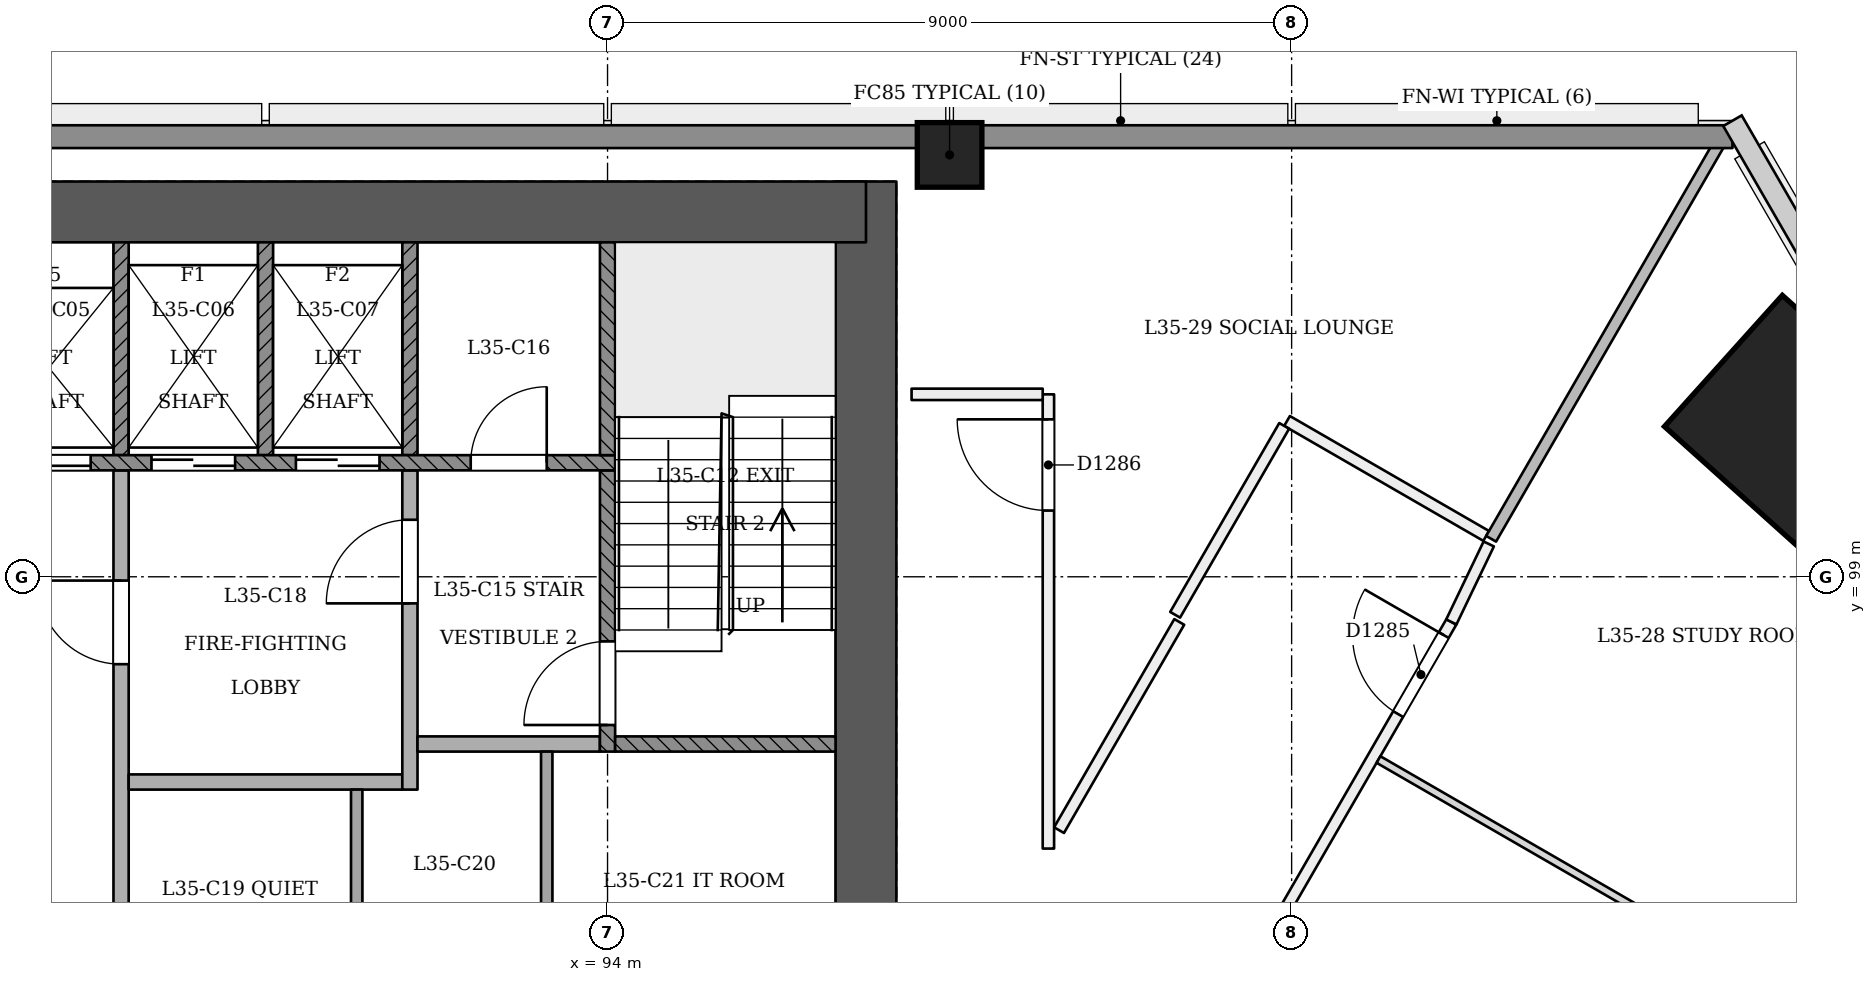
"""IFC4 building model, lengths in metres.
Left out: names, types, materials, properties, quantities, classifications, styles, units other than length and angle.
Written with IfcOpenShell. Run it as: python <this file> out.ifc"""

import sys

from ifc_helpers import new_model, si_unit, direction, frame, frame_2d, origin, origin_2d, place, context, subcontext, project, spatial, rectangle, extrude, element, fill, save


model = new_model("IFC4")
c1 = context("Model", 3, precision=1e-05, world=origin(), true_north=direction((0.0, 1.0)))
c2 = subcontext(c1, "Body", "Model", "MODEL_VIEW")
j1 = project(units=[si_unit("LENGTHUNIT", "METRE"), si_unit("PLANEANGLEUNIT", "RADIAN")], contexts=[c1])
p1 = place(None, origin())
s1 = spatial("IfcSite", under=j1, at=p1, CompositionType="ELEMENT")
p2 = place(p1, origin())
s2 = spatial("IfcBuilding", under=s1, at=p2, CompositionType="ELEMENT")
p3 = place(p2, frame((0.0, 0.0, 138.6)))
s3 = spatial("IfcBuildingStorey", under=s2, at=p3, CompositionType="ELEMENT", Elevation=138.6)
p4 = place(p3, frame((97.4, 93.0, 0.0), z_axis=(0.0, 0.0, 1.0), x_axis=(0.0, 1.0, 0.0)))
e1 = element("IfcWall", 1, at=p4, inside=s3, PredefinedType="SHEAR", context=c2, shape_type="SweptSolid", body=[
    extrude(rectangle(XDim=11.2, YDim=0.8, at=frame_2d((5.6, 0.0))), origin(), (0.0, 0.0, 1.0), 3.6),
])
p5 = place(p3, frame((97.4, 103.8, 0.0), z_axis=(0.0, 0.0, 1.0), x_axis=(-1.0, 0.0, 0.0)))
e2 = element("IfcWall", 2, at=p5, inside=s3, PredefinedType="SHEAR", context=c2, shape_type="SweptSolid", body=[
    extrude(rectangle(XDim=25.2, YDim=0.8, at=frame_2d((12.6, 0.0))), origin(), (0.0, 0.0, 1.0), 3.6),
])
p6 = place(p3, frame((109.577, 101.053, 0.0), z_axis=(-0.028403721265, 0.009287135593, 0.999553389135), x_axis=(0.498883801201, -0.866383831898, 0.022226307065)))
e3 = element("IfcColumn", 3, at=p6, inside=s3, PredefinedType="COLUMN", context=c2, shape_type="SweptSolid", body=[
    extrude(rectangle(XDim=2.32, YDim=2.32, at=origin_2d()), origin(), (0.0, 0.0, 1.0), 3.602),
])
p7 = place(p3, frame((98.5, 104.55, 0.0), z_axis=(0.0, 0.0, 1.0), x_axis=(1.0, 0.0, 0.0)))
e4 = element("IfcColumn", 4, at=p7, inside=s3, PredefinedType="COLUMN", context=c2, shape_type="SweptSolid", body=[
    extrude(rectangle(XDim=0.85, YDim=0.85, at=origin_2d()), origin(), (0.0, 0.0, 1.0), 3.6),
])
p8 = place(p3, frame((85.054, 63.684, 0.0), z_axis=(0.0, 0.0, 1.0), x_axis=(0.499999704591, 0.866025574339, 0.0)))
e5 = element("IfcWall", 5, at=p8, inside=s3, PredefinedType="PARTITIONING", context=c2, shape_type="SweptSolid", body=[
    extrude(rectangle(XDim=40.094, YDim=0.15, at=frame_2d((20.047, 0.0))), origin(), (0.0, 0.0, 1.0), 2.75),
])
p9 = place(p8, frame((0.506, 0.0, 0.0)))
e6 = element("IfcOpeningElement", 6, at=p9, cuts=e5, PredefinedType="OPENING", context=c2, shape_type="SweptSolid", body=[
    extrude(rectangle(XDim=1.2, YDim=2.1, at=frame_2d((0.6, 1.05))), frame((0.0, 0.085, 0.0), z_axis=(0.0, -1.0, 0.0), x_axis=(1.0, 0.0, 0.0)), (0.0, 0.0, 1.0), 0.171),
])
p10 = place(p8, frame((2.767, 0.0, 0.0)))
e7 = element("IfcOpeningElement", 7, at=p10, cuts=e5, PredefinedType="OPENING", context=c2, shape_type="SweptSolid", body=[
    extrude(rectangle(XDim=1.0, YDim=2.1, at=frame_2d((0.5, 1.05))), frame((0.0, 0.085, 0.0), z_axis=(0.0, -1.0, 0.0), x_axis=(1.0, 0.0, 0.0)), (0.0, 0.0, 1.0), 0.171),
])
p11 = place(p8, frame((8.297, 0.0, 0.0)))
e8 = element("IfcOpeningElement", 8, at=p11, cuts=e5, PredefinedType="OPENING", context=c2, shape_type="SweptSolid", body=[
    extrude(rectangle(XDim=1.0, YDim=2.1, at=frame_2d((0.5, 1.05))), frame((0.0, 0.085, 0.0), z_axis=(0.0, -1.0, 0.0), x_axis=(1.0, 0.0, 0.0)), (0.0, 0.0, 1.0), 0.171),
])
p12 = place(p8, frame((11.652, 0.0, 0.0)))
e9 = element("IfcOpeningElement", 9, at=p12, cuts=e5, PredefinedType="OPENING", context=c2, shape_type="SweptSolid", body=[
    extrude(rectangle(XDim=1.0, YDim=2.1, at=frame_2d((0.5, 1.05))), frame((0.0, 0.085, 0.0), z_axis=(0.0, -1.0, 0.0), x_axis=(1.0, 0.0, 0.0)), (0.0, 0.0, 1.0), 0.171),
])
p13 = place(p8, frame((18.327, 0.0, 0.0)))
e10 = element("IfcOpeningElement", 10, at=p13, cuts=e5, PredefinedType="OPENING", context=c2, shape_type="SweptSolid", body=[
    extrude(rectangle(XDim=1.0, YDim=2.1, at=frame_2d((0.5, 1.05))), frame((0.0, 0.085, 0.0), z_axis=(0.0, -1.0, 0.0), x_axis=(1.0, 0.0, 0.0)), (0.0, 0.0, 1.0), 0.171),
])
p14 = place(p8, frame((20.767, 0.0, 0.0)))
e11 = element("IfcOpeningElement", 11, at=p14, cuts=e5, PredefinedType="OPENING", context=c2, shape_type="SweptSolid", body=[
    extrude(rectangle(XDim=1.0, YDim=2.1, at=frame_2d((0.5, 1.05))), frame((0.0, 0.085, 0.0), z_axis=(0.0, -1.0, 0.0), x_axis=(1.0, 0.0, 0.0)), (0.0, 0.0, 1.0), 0.171),
])
p15 = place(p8, frame((26.297, 0.0, 0.0)))
e12 = element("IfcOpeningElement", 12, at=p15, cuts=e5, PredefinedType="OPENING", context=c2, shape_type="SweptSolid", body=[
    extrude(rectangle(XDim=1.0, YDim=2.1, at=frame_2d((0.5, 1.05))), frame((0.0, 0.085, 0.0), z_axis=(0.0, -1.0, 0.0), x_axis=(1.0, 0.0, 0.0)), (0.0, 0.0, 1.0), 0.171),
])
p16 = place(p8, frame((31.847, 0.0, 0.0)))
e13 = element("IfcOpeningElement", 13, at=p16, cuts=e5, PredefinedType="OPENING", context=c2, shape_type="SweptSolid", body=[
    extrude(rectangle(XDim=1.2, YDim=2.1, at=frame_2d((0.6, 1.05))), frame((0.0, 0.085, 0.0), z_axis=(0.0, -1.0, 0.0), x_axis=(1.0, 0.0, 0.0)), (0.0, 0.0, 1.0), 0.171),
])
p17 = place(p8, frame((38.694, 0.0, 0.0)))
e14 = element("IfcOpeningElement", 14, at=p17, cuts=e5, PredefinedType="OPENING", context=c2, shape_type="SweptSolid", body=[
    extrude(rectangle(XDim=1.2, YDim=2.1, at=frame_2d((0.6, 1.05))), frame((0.0, 0.085, 0.0), z_axis=(0.0, -1.0, 0.0), x_axis=(1.0, 0.0, 0.0)), (0.0, 0.0, 1.0), 0.171),
])
p18 = place(p3, frame((105.101, 98.406, 0.0), z_axis=(0.0, 0.0, 1.0), x_axis=(0.432472883735, 0.901646940234, 0.0)))
e15 = element("IfcWall", 15, at=p18, inside=s3, PredefinedType="PARTITIONING", context=c2, shape_type="SweptSolid", body=[
    extrude(rectangle(XDim=1.137, YDim=0.15, at=frame_2d((0.569, 0.0))), origin(), (0.0, 0.0, 1.0), 3.15),
])
p19 = place(p3, frame((105.559, 99.538, 0.0), z_axis=(0.0, 0.0, 1.0), x_axis=(-0.866024298998, 0.500001913541, 0.0)))
e16 = element("IfcWall", 16, at=p19, inside=s3, PredefinedType="PARTITIONING", context=c2, shape_type="SweptSolid", body=[
    extrude(rectangle(XDim=3.025, YDim=0.15, at=frame_2d((1.512, 0.0))), origin(), (0.0, 0.0, 1.0), 3.15),
])
p20 = place(p3, frame((102.902, 100.985, 0.0), z_axis=(0.0, 0.0, 1.0), x_axis=(-0.499945861543, -0.866056658381, 0.0)))
e17 = element("IfcWall", 17, at=p20, inside=s3, PredefinedType="PARTITIONING", context=c2, shape_type="SweptSolid", body=[
    extrude(rectangle(XDim=2.869, YDim=0.15, at=frame_2d((1.435, 0.0))), origin(), (0.0, 0.0, 1.0), 3.15),
])
p21 = place(p3, frame((101.522, 98.406, 0.0), z_axis=(0.0, 0.0, 1.0), x_axis=(-0.499998569178, -0.866026229868, 0.0)))
e18 = element("IfcWall", 18, at=p21, inside=s3, PredefinedType="PARTITIONING", context=c2, shape_type="SweptSolid", body=[
    extrude(rectangle(XDim=3.164, YDim=0.15, at=frame_2d((1.582, 0.0))), origin(), (0.0, 0.0, 1.0), 3.15),
])
p22 = place(p3, frame((99.8, 95.424, 0.0), z_axis=(0.0, 0.0, 1.0), x_axis=(0.0, 1.0, 0.0)))
e19 = element("IfcWall", 19, at=p22, inside=s3, PredefinedType="PARTITIONING", context=c2, shape_type="SweptSolid", body=[
    extrude(rectangle(XDim=5.976, YDim=0.15, at=frame_2d((2.988, 0.0))), origin(), (0.0, 0.0, 1.0), 3.15),
])
p23 = place(p22, frame((4.447, 0.0, 0.0)))
e20 = element("IfcOpeningElement", 20, at=p23, cuts=e19, PredefinedType="OPENING", context=c2, shape_type="SweptSolid", body=[
    extrude(rectangle(XDim=1.2, YDim=2.1, at=frame_2d((0.6, 1.05))), frame((0.0, 0.085, 0.0), z_axis=(0.0, -1.0, 0.0), x_axis=(1.0, 0.0, 0.0)), (0.0, 0.0, 1.0), 0.171),
])
p24 = place(p3, frame((99.725, 101.4, 0.0), z_axis=(0.0, 0.0, 1.0), x_axis=(-1.0, 0.0, 0.0)))
e21 = element("IfcWall", 21, at=p24, inside=s3, PredefinedType="PARTITIONING", context=c2, shape_type="SweptSolid", body=[
    extrude(rectangle(XDim=1.725, YDim=0.15, at=frame_2d((0.863, 0.0))), origin(), (0.0, 0.0, 1.0), 3.15),
])
p25 = place(p3, frame((109.638, 93.423, 0.0), z_axis=(0.0, 0.0, 1.0), x_axis=(-0.866025401434, 0.500000004071, 0.0)))
e22 = element("IfcWall", 22, at=p25, inside=s3, PredefinedType="PARTITIONING", context=c2, shape_type="SweptSolid", body=[
    extrude(rectangle(XDim=6.345, YDim=0.1, at=frame_2d((3.173, 0.0))), origin(), (0.0, 0.0, 1.0), 2.65),
])
p26 = place(p3, frame((108.742, 104.9, 0.0), z_axis=(0.0, 0.0, 1.0), x_axis=(-0.500004896655, -0.866022576681, 0.0)))
e23 = element("IfcWall", 23, at=p26, inside=s3, PredefinedType="PARTITIONING", context=c2, shape_type="SweptSolid", body=[
    extrude(rectangle(XDim=6.235, YDim=0.15, at=frame_2d((3.118, 0.0))), origin(), (0.0, 0.0, 1.0), 2.65),
])
p27 = place(p3, frame((61.2, 104.79, 0.0), z_axis=(0.0, 0.0, 1.0), x_axis=(1.0, 0.0, 0.0)))
e24 = element("IfcWall", 24, at=p27, inside=s3, PredefinedType="SOLIDWALL", context=c2, shape_type="SweptSolid", body=[
    extrude(rectangle(XDim=47.6, YDim=0.3, at=frame_2d((23.8, 0.0))), origin(), (0.0, 0.0, 1.0), 2.65),
])
p28 = place(p3, frame((87.6, 93.4, 0.0), z_axis=(0.0, 0.0, 1.0), x_axis=(0.0, 1.0, 0.0)))
e25 = element("IfcWall", 25, at=p28, inside=s3, PredefinedType="PARTITIONING", context=c2, shape_type="SweptSolid", body=[
    extrude(rectangle(XDim=7.0, YDim=0.2, at=frame_2d((3.5, 0.0))), origin(), (0.0, 0.0, 1.0), 3.15),
])
p29 = place(p28, frame((4.45, 0.0, 0.0)))
e26 = element("IfcOpeningElement", 26, at=p29, cuts=e25, PredefinedType="OPENING", context=c2, shape_type="SweptSolid", body=[
    extrude(rectangle(XDim=1.1, YDim=2.1, at=frame_2d((0.55, 1.05))), frame((0.0, 0.11, 0.0), z_axis=(0.0, -1.0, 0.0), x_axis=(1.0, 0.0, 0.0)), (0.0, 0.0, 1.0), 0.221),
])
p30 = place(p3, frame((90.7, 93.4, 0.0), z_axis=(0.0, 0.0, 1.0), x_axis=(0.0, 1.0, 0.0)))
e27 = element("IfcWall", 27, at=p30, inside=s3, PredefinedType="PARTITIONING", context=c2, shape_type="SweptSolid", body=[
    extrude(rectangle(XDim=2.8, YDim=0.15, at=frame_2d((1.4, 0.0))), origin(), (0.0, 0.0, 1.0), 3.15),
])
p31 = place(p3, frame((93.2, 93.4, 0.0), z_axis=(0.0, 0.0, 1.0), x_axis=(0.0, 1.0, 0.0)))
e28 = element("IfcWall", 28, at=p31, inside=s3, PredefinedType="PARTITIONING", context=c2, shape_type="SweptSolid", body=[
    extrude(rectangle(XDim=3.3, YDim=0.15, at=frame_2d((1.65, 0.0))), origin(), (0.0, 0.0, 1.0), 3.15),
])
p32 = place(p3, frame((87.7, 96.3, 0.0), z_axis=(0.0, 0.0, 1.0), x_axis=(1.0, 0.0, 0.0)))
e29 = element("IfcWall", 29, at=p32, inside=s3, PredefinedType="PARTITIONING", context=c2, shape_type="SweptSolid", body=[
    extrude(rectangle(XDim=3.6, YDim=0.2, at=frame_2d((1.8, 0.0))), origin(), (0.0, 0.0, 1.0), 3.15),
])
p33 = place(p3, frame((91.4, 96.2, 0.0), z_axis=(0.0, 0.0, 1.0), x_axis=(0.0, 1.0, 0.0)))
e30 = element("IfcWall", 30, at=p33, inside=s3, PredefinedType="PARTITIONING", context=c2, shape_type="SweptSolid", body=[
    extrude(rectangle(XDim=4.2, YDim=0.2, at=frame_2d((2.1, 0.0))), origin(), (0.0, 0.0, 1.0), 3.15),
])
p34 = place(p33, frame((2.45, 0.0, 0.0)))
e31 = element("IfcOpeningElement", 31, at=p34, cuts=e30, PredefinedType="OPENING", context=c2, shape_type="SweptSolid", body=[
    extrude(rectangle(XDim=1.1, YDim=2.1, at=frame_2d((0.55, 1.05))), frame((0.0, 0.11, 0.0), z_axis=(0.0, -1.0, 0.0), x_axis=(1.0, 0.0, 0.0)), (0.0, 0.0, 1.0), 0.221),
])
p35 = place(p3, frame((91.5, 96.8, 0.0), z_axis=(0.0, 0.0, 1.0), x_axis=(1.0, 0.0, 0.0)))
e32 = element("IfcWall", 32, at=p35, inside=s3, PredefinedType="PARTITIONING", context=c2, shape_type="SweptSolid", body=[
    extrude(rectangle(XDim=2.4, YDim=0.2, at=frame_2d((1.2, 0.0))), origin(), (0.0, 0.0, 1.0), 3.15),
])
p36 = place(p3, frame((94.0, 96.7, 0.0), z_axis=(0.0, 0.0, 1.0), x_axis=(0.0, 1.0, 0.0)))
e33 = element("IfcWall", 33, at=p36, inside=s3, PredefinedType="SOLIDWALL", context=c2, shape_type="SweptSolid", body=[
    extrude(rectangle(XDim=3.7, YDim=0.2, at=frame_2d((1.85, 0.0))), origin(), (0.0, 0.0, 1.0), 3.15),
])
p37 = place(p36, frame((0.35, 0.0, 0.0)))
e34 = element("IfcOpeningElement", 34, at=p37, cuts=e33, PredefinedType="OPENING", context=c2, shape_type="SweptSolid", body=[
    extrude(rectangle(XDim=1.1, YDim=2.1, at=frame_2d((0.55, 1.05))), frame((0.0, 0.11, 0.0), z_axis=(0.0, -1.0, 0.0), x_axis=(1.0, 0.0, 0.0)), (0.0, 0.0, 1.0), 0.221),
])
p38 = place(p3, frame((94.1, 96.8, 0.0), z_axis=(0.0, 0.0, 1.0), x_axis=(1.0, 0.0, 0.0)))
e35 = element("IfcWall", 35, at=p38, inside=s3, PredefinedType="SOLIDWALL", context=c2, shape_type="SweptSolid", body=[
    extrude(rectangle(XDim=2.9, YDim=0.2, at=frame_2d((1.45, 0.0))), origin(), (0.0, 0.0, 1.0), 3.15),
])
p39 = place(p3, frame((75.9, 100.5, 0.0), z_axis=(0.0, 0.0, 1.0), x_axis=(1.0, 0.0, 0.0)))
e36 = element("IfcWall", 36, at=p39, inside=s3, PredefinedType="SOLIDWALL", context=c2, shape_type="SweptSolid", body=[
    extrude(rectangle(XDim=18.2, YDim=0.2, at=frame_2d((9.1, 0.0))), origin(), (0.0, 0.0, 1.0), 3.15),
])
p40 = place(p39, frame((2.6, 0.0, 0.0)))
e37 = element("IfcOpeningElement", 37, at=p40, cuts=e36, PredefinedType="OPENING", context=c2, shape_type="SweptSolid", body=[
    extrude(rectangle(XDim=1.1, YDim=2.1, at=frame_2d((0.55, 1.05))), frame((0.0, 0.11, 0.0), z_axis=(0.0, -1.0, 0.0), x_axis=(1.0, 0.0, 0.0)), (0.0, 0.0, 1.0), 0.221),
])
p41 = place(p39, frame((4.5, 0.0, 0.0)))
e38 = element("IfcOpeningElement", 38, at=p41, cuts=e36, PredefinedType="OPENING", context=c2, shape_type="SweptSolid", body=[
    extrude(rectangle(XDim=1.1, YDim=2.1, at=frame_2d((0.55, 1.05))), frame((0.0, 0.11, 0.0), z_axis=(0.0, -1.0, 0.0), x_axis=(1.0, 0.0, 0.0)), (0.0, 0.0, 1.0), 0.221),
])
p42 = place(p39, frame((6.4, 0.0, 0.0)))
e39 = element("IfcOpeningElement", 39, at=p42, cuts=e36, PredefinedType="OPENING", context=c2, shape_type="SweptSolid", body=[
    extrude(rectangle(XDim=1.1, YDim=2.1, at=frame_2d((0.55, 1.05))), frame((0.0, 0.11, 0.0), z_axis=(0.0, -1.0, 0.0), x_axis=(1.0, 0.0, 0.0)), (0.0, 0.0, 1.0), 0.221),
])
p43 = place(p39, frame((8.3, 0.0, 0.0)))
e40 = element("IfcOpeningElement", 40, at=p43, cuts=e36, PredefinedType="OPENING", context=c2, shape_type="SweptSolid", body=[
    extrude(rectangle(XDim=1.1, YDim=2.1, at=frame_2d((0.55, 1.05))), frame((0.0, 0.11, 0.0), z_axis=(0.0, -1.0, 0.0), x_axis=(1.0, 0.0, 0.0)), (0.0, 0.0, 1.0), 0.221),
])
p44 = place(p39, frame((10.2, 0.0, 0.0)))
e41 = element("IfcOpeningElement", 41, at=p44, cuts=e36, PredefinedType="OPENING", context=c2, shape_type="SweptSolid", body=[
    extrude(rectangle(XDim=1.1, YDim=2.1, at=frame_2d((0.55, 1.05))), frame((0.0, 0.11, 0.0), z_axis=(0.0, -1.0, 0.0), x_axis=(1.0, 0.0, 0.0)), (0.0, 0.0, 1.0), 0.221),
])
p45 = place(p39, frame((12.1, 0.0, 0.0)))
e42 = element("IfcOpeningElement", 42, at=p45, cuts=e36, PredefinedType="OPENING", context=c2, shape_type="SweptSolid", body=[
    extrude(rectangle(XDim=1.1, YDim=2.1, at=frame_2d((0.55, 1.05))), frame((0.0, 0.11, 0.0), z_axis=(0.0, -1.0, 0.0), x_axis=(1.0, 0.0, 0.0)), (0.0, 0.0, 1.0), 0.221),
])
p46 = place(p39, frame((14.0, 0.0, 0.0)))
e43 = element("IfcOpeningElement", 43, at=p46, cuts=e36, PredefinedType="OPENING", context=c2, shape_type="SweptSolid", body=[
    extrude(rectangle(XDim=1.1, YDim=2.1, at=frame_2d((0.55, 1.05))), frame((0.0, 0.11, 0.0), z_axis=(0.0, -1.0, 0.0), x_axis=(1.0, 0.0, 0.0)), (0.0, 0.0, 1.0), 0.221),
])
p47 = place(p39, frame((0.65, 0.0, 0.0)))
e44 = element("IfcOpeningElement", 44, at=p47, cuts=e36, PredefinedType="OPENING", context=c2, shape_type="SweptSolid", body=[
    extrude(rectangle(XDim=1.0, YDim=2.1, at=frame_2d((0.5, 1.05))), frame((0.0, 0.11, 0.0), z_axis=(0.0, -1.0, 0.0), x_axis=(1.0, 0.0, 0.0)), (0.0, 0.0, 1.0), 0.221),
])
p48 = place(p39, frame((16.3, 0.0, 0.0)))
e45 = element("IfcOpeningElement", 45, at=p48, cuts=e36, PredefinedType="OPENING", context=c2, shape_type="SweptSolid", body=[
    extrude(rectangle(XDim=1.0, YDim=2.1, at=frame_2d((0.5, 1.05))), frame((0.0, 0.11, 0.0), z_axis=(0.0, -1.0, 0.0), x_axis=(1.0, 0.0, 0.0)), (0.0, 0.0, 1.0), 0.221),
])
for number, where, z_axis, x_axis in (
    (46, (87.6, 100.6, 0.0), (0.0, 0.0, 1.0), (0.0, 1.0, 0.0)),
    (47, (89.5, 100.6, 0.0), (0.0, 0.0, 1.0), (0.0, 1.0, 0.0)),
    (48, (91.4, 100.6, 0.0), (0.0, 0.0, 1.0), (0.0, 1.0, 0.0)),
    (49, (94.0, 100.6, 0.0), (0.0, 0.0, 1.0), (0.0, 1.0, 0.0)),
):
    element("IfcWall", number, at=place(p3, frame(where, z_axis=z_axis, x_axis=x_axis)), inside=s3, PredefinedType="SOLIDWALL", context=c2, shape_type="SweptSolid", body=[
        extrude(rectangle(XDim=2.8, YDim=0.2, at=frame_2d((1.4, 0.0))), origin(), (0.0, 0.0, 1.0), 3.15),
    ])
p49 = place(p17, origin())
e50 = element("IfcDoor", 50, at=p49, inside=s3, OperationType="SINGLE_SWING_RIGHT", PredefinedType="NOTDEFINED", context=c2, shape_type="SweptSolid", body=[
    extrude(rectangle(XDim=1.2, YDim=2.1, at=frame_2d((0.6, 1.05))), frame((0.0, 0.025, 0.0), z_axis=(0.0, -1.0, 0.0), x_axis=(1.0, 0.0, 0.0)), (0.0, 0.0, 1.0), 0.05),
])
fill(e14, e50)
p50 = place(p23, origin())
e51 = element("IfcDoor", 51, at=p50, inside=s3, OperationType="SINGLE_SWING_RIGHT", PredefinedType="NOTDEFINED", context=c2, shape_type="SweptSolid", body=[
    extrude(rectangle(XDim=1.2, YDim=2.1, at=frame_2d((0.6, 1.05))), frame((0.0, 0.025, 0.0), z_axis=(0.0, -1.0, 0.0), x_axis=(1.0, 0.0, 0.0)), (0.0, 0.0, 1.0), 0.05),
])
fill(e20, e51)
p51 = place(p44, origin())
e52 = element("IfcDoor", 52, at=p51, inside=s3, OperationType="SLIDING_TO_RIGHT", PredefinedType="NOTDEFINED", context=c2, shape_type="SweptSolid", body=[
    extrude(rectangle(XDim=1.1, YDim=2.1, at=frame_2d((0.55, 1.05))), frame((0.0, 0.025, 0.0), z_axis=(0.0, -1.0, 0.0), x_axis=(1.0, 0.0, 0.0)), (0.0, 0.0, 1.0), 0.05),
])
fill(e41, e52)
p52 = place(p45, origin())
e53 = element("IfcDoor", 53, at=p52, inside=s3, OperationType="SLIDING_TO_RIGHT", PredefinedType="NOTDEFINED", context=c2, shape_type="SweptSolid", body=[
    extrude(rectangle(XDim=1.1, YDim=2.1, at=frame_2d((0.55, 1.05))), frame((0.0, 0.025, 0.0), z_axis=(0.0, -1.0, 0.0), x_axis=(1.0, 0.0, 0.0)), (0.0, 0.0, 1.0), 0.05),
])
fill(e42, e53)
p53 = place(p46, origin())
e54 = element("IfcDoor", 54, at=p53, inside=s3, OperationType="SLIDING_TO_LEFT", PredefinedType="NOTDEFINED", context=c2, shape_type="SweptSolid", body=[
    extrude(rectangle(XDim=1.1, YDim=2.1, at=frame_2d((0.55, 1.05))), frame((0.0, 0.025, 0.0), z_axis=(0.0, -1.0, 0.0), x_axis=(1.0, 0.0, 0.0)), (0.0, 0.0, 1.0), 0.05),
])
fill(e43, e54)
p54 = place(p37, origin())
e55 = element("IfcDoor", 55, at=p54, inside=s3, OperationType="SINGLE_SWING_LEFT", PredefinedType="NOTDEFINED", context=c2, shape_type="SweptSolid", body=[
    extrude(rectangle(XDim=1.1, YDim=2.1, at=frame_2d((0.55, 1.05))), frame((0.0, 0.025, 0.0), z_axis=(0.0, -1.0, 0.0), x_axis=(1.0, 0.0, 0.0)), (0.0, 0.0, 1.0), 0.05),
])
fill(e34, e55)
p55 = place(p29, origin())
e56 = element("IfcDoor", 56, at=p55, inside=s3, OperationType="SINGLE_SWING_RIGHT", PredefinedType="NOTDEFINED", context=c2, shape_type="SweptSolid", body=[
    extrude(rectangle(XDim=1.1, YDim=2.1, at=frame_2d((0.55, 1.05))), frame((0.0, 0.025, 0.0), z_axis=(0.0, -1.0, 0.0), x_axis=(1.0, 0.0, 0.0)), (0.0, 0.0, 1.0), 0.05),
])
fill(e26, e56)
p56 = place(p34, origin())
e57 = element("IfcDoor", 57, at=p56, inside=s3, OperationType="SINGLE_SWING_LEFT", PredefinedType="NOTDEFINED", context=c2, shape_type="SweptSolid", body=[
    extrude(rectangle(XDim=1.1, YDim=2.1, at=frame_2d((0.55, 1.05))), frame((0.0, 0.025, 0.0), z_axis=(0.0, -1.0, 0.0), x_axis=(1.0, 0.0, 0.0)), (0.0, 0.0, 1.0), 0.05),
])
fill(e31, e57)
p57 = place(p48, origin())
e58 = element("IfcDoor", 58, at=p57, inside=s3, OperationType="SINGLE_SWING_RIGHT", PredefinedType="NOTDEFINED", context=c2, shape_type="SweptSolid", body=[
    extrude(rectangle(XDim=1.0, YDim=2.1, at=frame_2d((0.5, 1.05))), frame((0.0, 0.025, 0.0), z_axis=(0.0, -1.0, 0.0), x_axis=(1.0, 0.0, 0.0)), (0.0, 0.0, 1.0), 0.05),
])
fill(e45, e58)
save(model, sys.argv[1])
